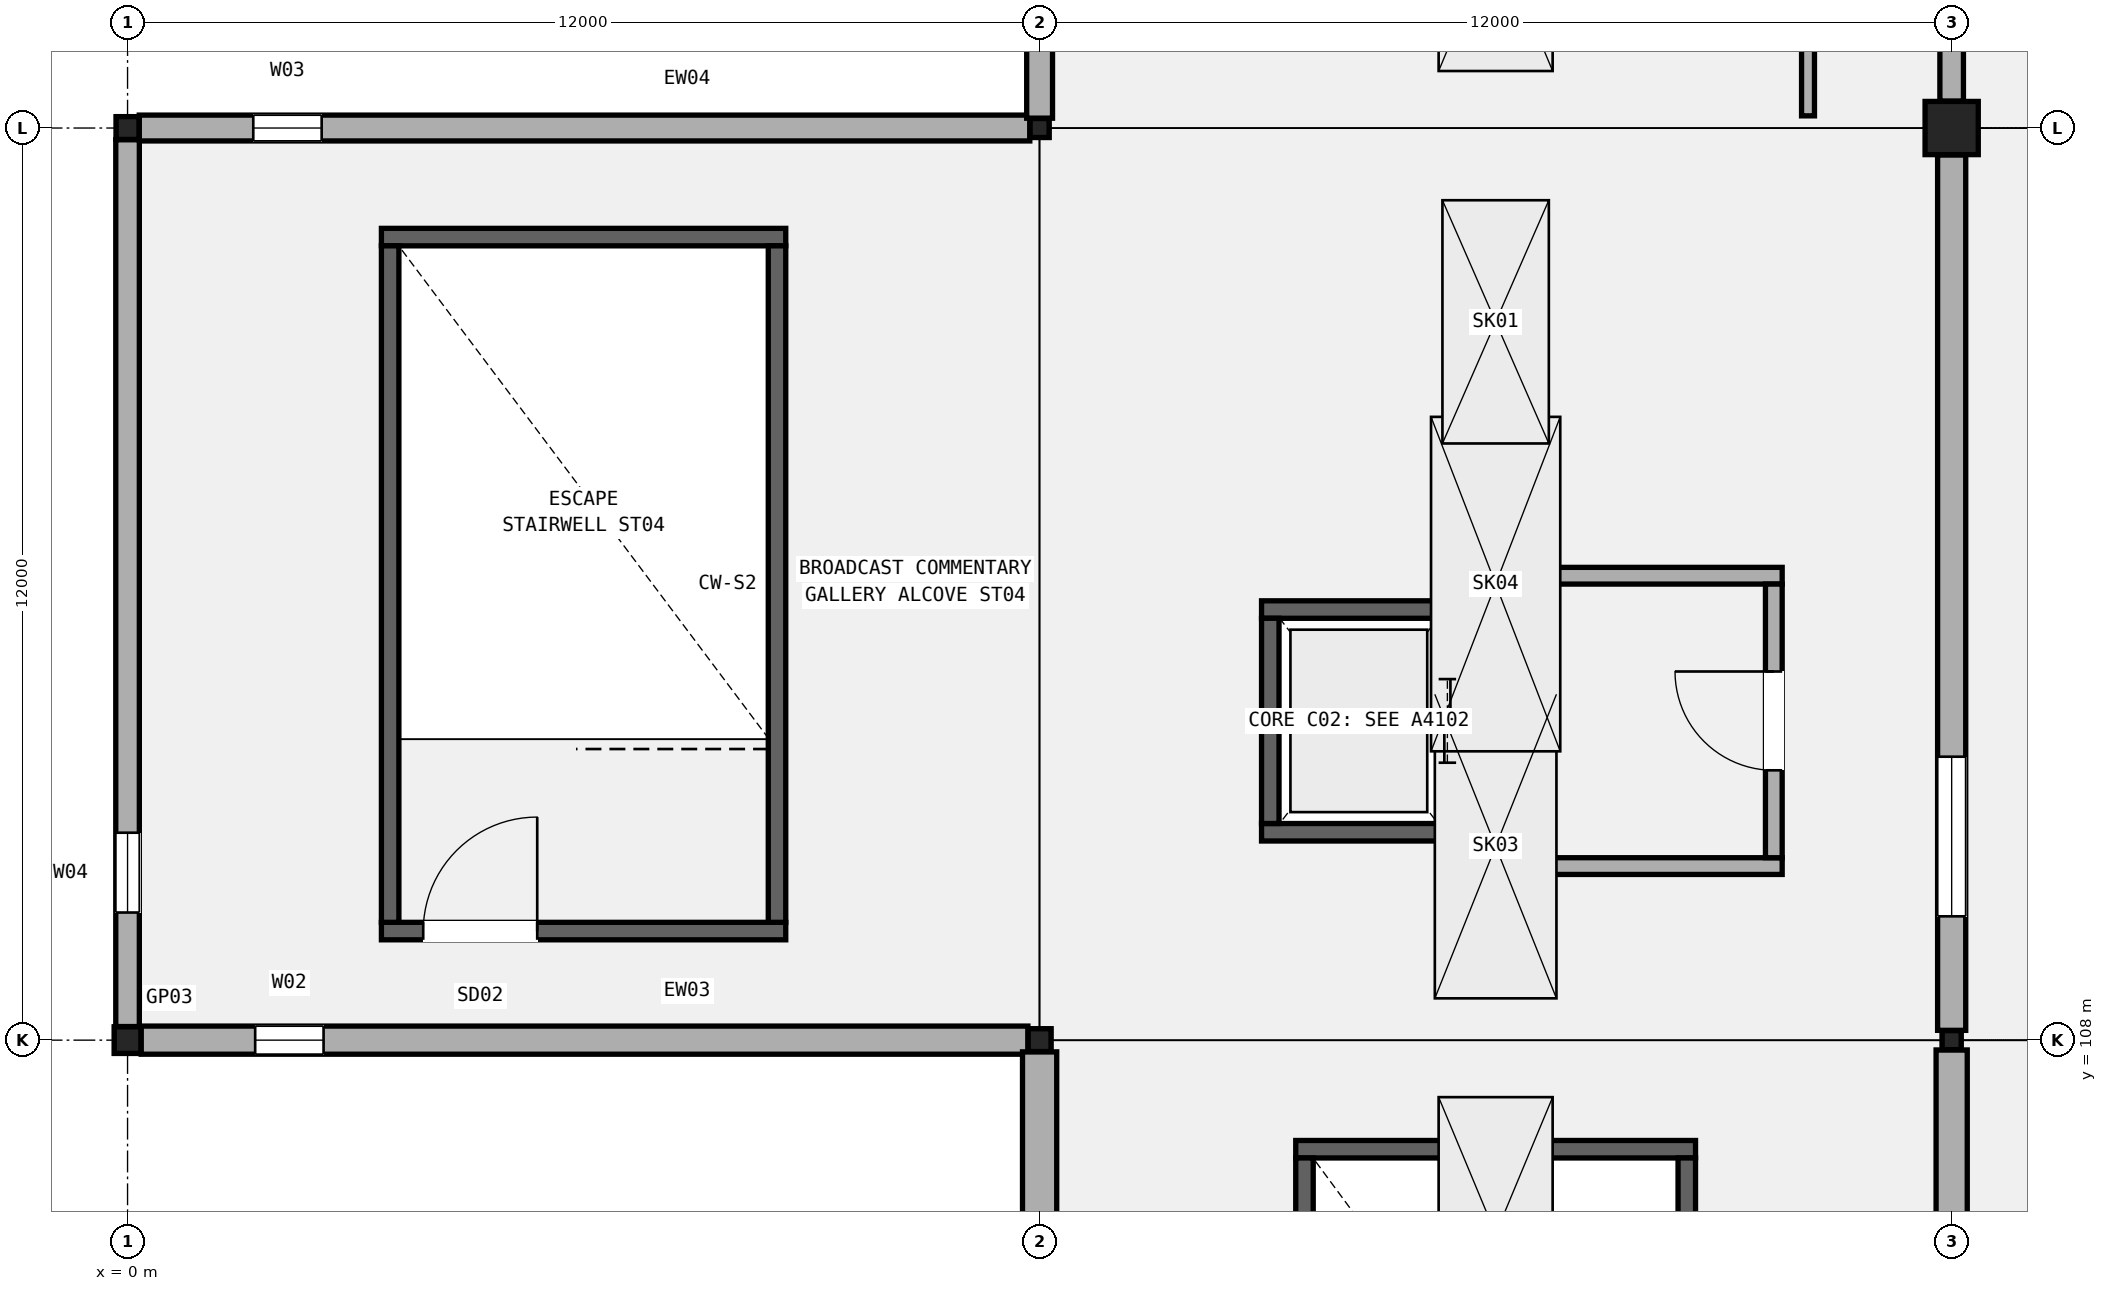
"""IFC4 building model, lengths in metres.
Left out: names, types, materials, properties, quantities, classifications, styles, units other than length and angle.
Written with IfcOpenShell. Run it as: python <this file> out.ifc"""

import sys

from ifc_helpers import new_model, si_unit, direction, frame, frame_2d, origin, origin_2d, place, context, subcontext, project, spatial, rectangle, hollow_rectangle, extrude, element, fill, save


model = new_model("IFC4")
c1 = context("Model", 3, precision=1e-05, world=origin(), true_north=direction((0.0, 1.0)))
c2 = subcontext(c1, "Body", "Model", "MODEL_VIEW")
j1 = project(units=[si_unit("LENGTHUNIT", "METRE"), si_unit("PLANEANGLEUNIT", "RADIAN")], contexts=[c1])
p1 = place(None, origin())
s1 = spatial("IfcSite", under=j1, at=p1, CompositionType="ELEMENT")
p2 = place(p1, origin())
s2 = spatial("IfcBuilding", under=s1, at=p2, CompositionType="ELEMENT")
p3 = place(p2, frame((0.0, 0.0, 25.8)))
s3 = spatial("IfcBuildingStorey", under=s2, at=p3, CompositionType="ELEMENT", Elevation=25.8)
p4 = place(p3, frame((0.0, 108.0, 0.0), z_axis=(0.0, 0.0, 1.0), x_axis=(1.0, 0.0, 0.0)))
e1 = element("IfcColumn", 1, at=p4, inside=s3, PredefinedType="COLUMN", context=c2, shape_type="SweptSolid", body=[
    extrude(hollow_rectangle(XDim=0.35, YDim=0.35, WallThickness=0.016, InnerFilletRadius=0.016, OuterFilletRadius=0.032, at=origin_2d()), origin(), (0.0, 0.0, 1.0), 5.4),
])
for number, where, z_axis, x_axis in (
    (2, (0.0, 120.0, 0.0), (0.0, 0.0, 1.0), (1.0, 0.0, 0.0)),
    (3, (12.0, 108.0, 0.0), (0.0, 0.0, 1.0), (1.0, 0.0, 0.0)),
):
    element("IfcColumn", number, at=place(p3, frame(where, z_axis=z_axis, x_axis=x_axis)), inside=s3, PredefinedType="COLUMN", context=c2, shape_type="SweptSolid", body=[
        extrude(hollow_rectangle(XDim=0.3, YDim=0.3, WallThickness=0.012, InnerFilletRadius=0.012, OuterFilletRadius=0.024, at=origin_2d()), origin(), (0.0, 0.0, 1.0), 5.4),
    ])
for number, where, z_axis, x_axis in (
    (4, (12.0, 120.0, 0.0), (0.0, 0.0, 1.0), (1.0, 0.0, 0.0)),
    (5, (24.0, 108.0, 0.0), (0.0, 0.0, 1.0), (1.0, 0.0, 0.0)),
):
    element("IfcColumn", number, at=place(p3, frame(where, z_axis=z_axis, x_axis=x_axis)), inside=s3, PredefinedType="COLUMN", context=c2, shape_type="SweptSolid", body=[
        extrude(hollow_rectangle(XDim=0.25, YDim=0.25, WallThickness=0.012, InnerFilletRadius=0.012, OuterFilletRadius=0.024, at=origin_2d()), origin(), (0.0, 0.0, 1.0), 5.4),
    ])
p5 = place(p3, frame((24.0, 120.0, 0.0), z_axis=(0.0, 0.0, 1.0), x_axis=(1.0, 0.0, 0.0)))
e6 = element("IfcColumn", 6, at=p5, inside=s3, PredefinedType="COLUMN", context=c2, shape_type="SweptSolid", body=[
    extrude(rectangle(XDim=0.7, YDim=0.7, at=origin_2d()), origin(), (0.0, 0.0, 1.0), 5.4),
])
p6 = place(p3, frame((0.179, 108.0, 0.0), z_axis=(0.0, 0.0, 1.0), x_axis=(1.0, 0.0, 0.0)))
e7 = element("IfcWall", 7, at=p6, inside=s3, PredefinedType="SOLIDWALL", context=c2, shape_type="SweptSolid", body=[
    extrude(rectangle(XDim=11.667, YDim=0.37, at=frame_2d((5.833, 0.0))), origin(), (0.0, 0.0, 1.0), 4.34),
])
p7 = place(p6, frame((1.5, 0.0, 0.95)))
e8 = element("IfcOpeningElement", 8, at=p7, cuts=e7, PredefinedType="OPENING", context=c2, shape_type="SweptSolid", body=[
    extrude(rectangle(XDim=0.9, YDim=2.4, at=frame_2d((0.45, 1.2))), frame((0.0, 0.195, 0.0), z_axis=(0.0, -1.0, 0.0), x_axis=(1.0, 0.0, 0.0)), (0.0, 0.0, 1.0), 0.39),
])
p8 = place(p3, frame((0.154, 120.0, 0.0), z_axis=(0.0, 0.0, 1.0), x_axis=(1.0, 0.0, 0.0)))
e9 = element("IfcWall", 9, at=p8, inside=s3, PredefinedType="SOLIDWALL", context=c2, shape_type="SweptSolid", body=[
    extrude(rectangle(XDim=11.717, YDim=0.34, at=frame_2d((5.858, 0.0))), origin(), (0.0, 0.0, 1.0), 4.44),
])
p9 = place(p8, frame((1.5, 0.0, 0.95)))
e10 = element("IfcOpeningElement", 10, at=p9, cuts=e9, PredefinedType="OPENING", context=c2, shape_type="SweptSolid", body=[
    extrude(rectangle(XDim=0.9, YDim=2.7, at=frame_2d((0.45, 1.35))), frame((0.0, 0.18, 0.0), z_axis=(0.0, -1.0, 0.0), x_axis=(1.0, 0.0, 0.0)), (0.0, 0.0, 1.0), 0.36),
])
p10 = place(p3, frame((0.0, 108.179, 0.0), z_axis=(0.0, 0.0, 1.0), x_axis=(0.0, 1.0, 0.0)))
e11 = element("IfcWall", 11, at=p10, inside=s3, PredefinedType="SOLIDWALL", context=c2, shape_type="SweptSolid", body=[
    extrude(rectangle(XDim=11.667, YDim=0.31, at=frame_2d((5.833, 0.0))), origin(), (0.0, 0.0, 1.0), 4.34),
])
p11 = place(p10, frame((1.5, 0.0, 0.95)))
e12 = element("IfcOpeningElement", 12, at=p11, cuts=e11, PredefinedType="OPENING", context=c2, shape_type="SweptSolid", body=[
    extrude(rectangle(XDim=1.05, YDim=2.2, at=frame_2d((0.525, 1.1))), frame((0.0, 0.165, 0.0), z_axis=(0.0, -1.0, 0.0), x_axis=(1.0, 0.0, 0.0)), (0.0, 0.0, 1.0), 0.33),
])
p12 = place(p3, frame((12.0, 96.179, 0.0), z_axis=(0.0, 0.0, 1.0), x_axis=(0.0, 1.0, 0.0)))
e13 = element("IfcWall", 13, at=p12, inside=s3, PredefinedType="SOLIDWALL", context=c2, shape_type="SweptSolid", body=[
    extrude(rectangle(XDim=11.667, YDim=0.45, at=frame_2d((5.833, 0.0))), origin(), (0.0, 0.0, 1.0), 4.34),
])
p13 = place(p12, frame((1.5, 0.0, 0.95)))
e14 = element("IfcOpeningElement", 14, at=p13, cuts=e13, PredefinedType="OPENING", context=c2, shape_type="SweptSolid", body=[
    extrude(rectangle(XDim=2.1, YDim=1.85, at=frame_2d((1.05, 0.925))), frame((0.0, 0.235, 0.0), z_axis=(0.0, -1.0, 0.0), x_axis=(1.0, 0.0, 0.0)), (0.0, 0.0, 1.0), 0.47),
])
p14 = place(p3, frame((24.0, 96.154, 0.0), z_axis=(0.0, 0.0, 1.0), x_axis=(0.0, 1.0, 0.0)))
e15 = element("IfcWall", 15, at=p14, inside=s3, PredefinedType="SOLIDWALL", context=c2, shape_type="SweptSolid", body=[
    extrude(rectangle(XDim=11.717, YDim=0.41, at=frame_2d((5.858, 0.0))), origin(), (0.0, 0.0, 1.0), 4.13),
])
p15 = place(p14, frame((1.5, 0.0, 0.95)))
e16 = element("IfcOpeningElement", 16, at=p15, cuts=e15, PredefinedType="OPENING", context=c2, shape_type="SweptSolid", body=[
    extrude(rectangle(XDim=2.1, YDim=2.25, at=frame_2d((1.05, 1.125))), frame((0.0, 0.215, 0.0), z_axis=(0.0, -1.0, 0.0), x_axis=(1.0, 0.0, 0.0)), (0.0, 0.0, 1.0), 0.43),
])
p16 = place(p3, frame((24.0, 108.129, 0.0), z_axis=(0.0, 0.0, 1.0), x_axis=(0.0, 1.0, 0.0)))
e17 = element("IfcWall", 17, at=p16, inside=s3, PredefinedType="SOLIDWALL", context=c2, shape_type="SweptSolid", body=[
    extrude(rectangle(XDim=11.517, YDim=0.37, at=frame_2d((5.759, 0.0))), origin(), (0.0, 0.0, 1.0), 4.13),
])
p17 = place(p16, frame((1.5, 0.0, 0.95)))
e18 = element("IfcOpeningElement", 18, at=p17, cuts=e17, PredefinedType="OPENING", context=c2, shape_type="SweptSolid", body=[
    extrude(rectangle(XDim=2.1, YDim=2.6, at=frame_2d((1.05, 1.3))), frame((0.0, 0.195, 0.0), z_axis=(0.0, -1.0, 0.0), x_axis=(1.0, 0.0, 0.0)), (0.0, 0.0, 1.0), 0.39),
])
p18 = place(p3, frame((12.0, 120.129, 0.0), z_axis=(0.0, 0.0, 1.0), x_axis=(0.0, 1.0, 0.0)))
e19 = element("IfcWall", 19, at=p18, inside=s3, PredefinedType="SOLIDWALL", context=c2, shape_type="SweptSolid", body=[
    extrude(rectangle(XDim=11.517, YDim=0.34, at=frame_2d((5.759, 0.0))), origin(), (0.0, 0.0, 1.0), 4.452),
])
p19 = place(p18, frame((6.034, 0.0, 0.95)))
e20 = element("IfcOpeningElement", 20, at=p19, cuts=e19, PredefinedType="OPENING", context=c2, shape_type="SweptSolid", body=[
    extrude(rectangle(XDim=2.25, YDim=1.8, at=frame_2d((1.125, 0.9))), frame((0.0, 0.18, 0.0), z_axis=(0.0, -1.0, 0.0), x_axis=(1.0, 0.0, 0.0)), (0.0, 0.0, 1.0), 0.36),
])
p20 = place(p3, frame((24.0, 120.354, 0.0), z_axis=(0.0, 0.0, 1.0), x_axis=(0.0, 1.0, 0.0)))
e21 = element("IfcWall", 21, at=p20, inside=s3, PredefinedType="SOLIDWALL", context=c2, shape_type="SweptSolid", body=[
    extrude(rectangle(XDim=11.342, YDim=0.31, at=frame_2d((5.671, 0.0))), origin(), (0.0, 0.0, 1.0), 4.13),
])
p21 = place(p20, frame((1.5, 0.0, 0.95)))
e22 = element("IfcOpeningElement", 22, at=p21, cuts=e21, PredefinedType="OPENING", context=c2, shape_type="SweptSolid", body=[
    extrude(rectangle(XDim=2.25, YDim=2.2, at=frame_2d((1.125, 1.1))), frame((0.0, 0.165, 0.0), z_axis=(0.0, -1.0, 0.0), x_axis=(1.0, 0.0, 0.0)), (0.0, 0.0, 1.0), 0.33),
])
p22 = place(p3, frame((3.34, 109.435, 0.0), z_axis=(0.0, 0.0, 1.0), x_axis=(1.0, 0.0, 0.0)))
e23 = element("IfcWall", 23, at=p22, inside=s3, PredefinedType="SHEAR", context=c2, shape_type="SweptSolid", body=[
    extrude(rectangle(XDim=5.32, YDim=0.23, at=frame_2d((2.66, 0.0))), origin(), (0.0, 0.0, 1.0), 5.04),
])
p23 = place(p22, frame((0.55, 0.0, 0.0)))
e24 = element("IfcOpeningElement", 24, at=p23, cuts=e23, PredefinedType="OPENING", context=c2, shape_type="SweptSolid", body=[
    extrude(rectangle(XDim=1.5, YDim=2.2, at=frame_2d((0.75, 1.1))), frame((0.0, 0.125, 0.0), z_axis=(0.0, -1.0, 0.0), x_axis=(1.0, 0.0, 0.0)), (0.0, 0.0, 1.0), 0.25),
])
p24 = place(p3, frame((3.34, 118.565, 0.0), z_axis=(0.0, 0.0, 1.0), x_axis=(1.0, 0.0, 0.0)))
e25 = element("IfcWall", 25, at=p24, inside=s3, PredefinedType="SHEAR", context=c2, shape_type="SweptSolid", body=[
    extrude(rectangle(XDim=5.32, YDim=0.23, at=frame_2d((2.66, 0.0))), origin(), (0.0, 0.0, 1.0), 5.04),
])
for number, where, z_axis, x_axis in (
    (26, (3.455, 109.55, 0.0), (0.0, 0.0, 1.0), (0.0, 1.0, 0.0)),
    (27, (8.545, 109.55, 0.0), (0.0, 0.0, 1.0), (0.0, 1.0, 0.0)),
):
    element("IfcWall", number, at=place(p3, frame(where, z_axis=z_axis, x_axis=x_axis)), inside=s3, PredefinedType="SHEAR", context=c2, shape_type="SweptSolid", body=[
        extrude(rectangle(XDim=8.9, YDim=0.23, at=frame_2d((4.45, 0.0))), origin(), (0.0, 0.0, 1.0), 5.04),
    ])
p25 = place(p3, frame((15.37, 106.565, 0.0), z_axis=(0.0, 0.0, 1.0), x_axis=(1.0, 0.0, 0.0)))
e28 = element("IfcWall", 28, at=p25, inside=s3, PredefinedType="SHEAR", context=c2, shape_type="SweptSolid", body=[
    extrude(rectangle(XDim=5.26, YDim=0.23, at=frame_2d((2.63, 0.0))), origin(), (0.0, 0.0, 1.0), 5.04),
])
for number, where, z_axis, x_axis in (
    (29, (15.485, 97.55, 0.0), (0.0, 0.0, 1.0), (0.0, 1.0, 0.0)),
    (30, (20.515, 97.55, 0.0), (0.0, 0.0, 1.0), (0.0, 1.0, 0.0)),
):
    element("IfcWall", number, at=place(p3, frame(where, z_axis=z_axis, x_axis=x_axis)), inside=s3, PredefinedType="SHEAR", context=c2, shape_type="SweptSolid", body=[
        extrude(rectangle(XDim=8.9, YDim=0.23, at=frame_2d((4.45, 0.0))), origin(), (0.0, 0.0, 1.0), 5.04),
    ])
for number, where, z_axis, x_axis in (
    (31, (14.92, 110.735, 0.0), (0.0, 0.0, 1.0), (1.0, 0.0, 0.0)),
    (32, (14.92, 113.665, 0.0), (0.0, 0.0, 1.0), (1.0, 0.0, 0.0)),
):
    element("IfcWall", number, at=place(p3, frame(where, z_axis=z_axis, x_axis=x_axis)), inside=s3, PredefinedType="SHEAR", context=c2, shape_type="SweptSolid", body=[
        extrude(rectangle(XDim=2.56, YDim=0.23, at=frame_2d((1.28, 0.0))), origin(), (0.0, 0.0, 1.0), 5.04),
    ])
p26 = place(p3, frame((15.035, 110.85, 0.0), z_axis=(0.0, 0.0, 1.0), x_axis=(0.0, 1.0, 0.0)))
e33 = element("IfcWall", 33, at=p26, inside=s3, PredefinedType="SHEAR", context=c2, shape_type="SweptSolid", body=[
    extrude(rectangle(XDim=2.7, YDim=0.23, at=frame_2d((1.35, 0.0))), origin(), (0.0, 0.0, 1.0), 5.04),
])
p27 = place(p3, frame((17.365, 110.85, 0.0), z_axis=(0.0, 0.0, 1.0), x_axis=(0.0, 1.0, 0.0)))
e34 = element("IfcWall", 34, at=p27, inside=s3, PredefinedType="SHEAR", context=c2, shape_type="SweptSolid", body=[
    extrude(rectangle(XDim=2.7, YDim=0.23, at=frame_2d((1.35, 0.0))), origin(), (0.0, 0.0, 1.0), 5.04),
])
p28 = place(p27, frame((0.8, 0.0, 0.0)))
e35 = element("IfcOpeningElement", 35, at=p28, cuts=e34, PredefinedType="OPENING", context=c2, shape_type="SweptSolid", body=[
    extrude(rectangle(XDim=1.1, YDim=2.15, at=frame_2d((0.55, 1.075))), frame((0.0, 0.125, 0.0), z_axis=(0.0, -1.0, 0.0), x_axis=(1.0, 0.0, 0.0)), (0.0, 0.0, 1.0), 0.25),
])
for number, where, z_axis, x_axis in (
    (36, (17.48, 110.29, 0.0), (0.0, 0.0, 1.0), (1.0, 0.0, 0.0)),
    (37, (17.48, 114.11, 0.0), (0.0, 0.0, 1.0), (1.0, 0.0, 0.0)),
):
    element("IfcWall", number, at=place(p3, frame(where, z_axis=z_axis, x_axis=x_axis)), inside=s3, PredefinedType="SOLIDWALL", context=c2, shape_type="SweptSolid", body=[
        extrude(rectangle(XDim=4.29, YDim=0.22, at=frame_2d((2.145, 0.0))), origin(), (0.0, 0.0, 1.0), 4.35),
    ])
p29 = place(p3, frame((21.66, 110.4, 0.0), z_axis=(0.0, 0.0, 1.0), x_axis=(0.0, 1.0, 0.0)))
e38 = element("IfcWall", 38, at=p29, inside=s3, PredefinedType="SOLIDWALL", context=c2, shape_type="SweptSolid", body=[
    extrude(rectangle(XDim=3.6, YDim=0.22, at=frame_2d((1.8, 0.0))), origin(), (0.0, 0.0, 1.0), 4.35),
])
p30 = place(p29, frame((1.15, 0.0, 0.0)))
e39 = element("IfcOpeningElement", 39, at=p30, cuts=e38, PredefinedType="OPENING", context=c2, shape_type="SweptSolid", body=[
    extrude(rectangle(XDim=1.3, YDim=2.15, at=frame_2d((0.65, 1.075))), frame((0.0, 0.12, 0.0), z_axis=(0.0, -1.0, 0.0), x_axis=(1.0, 0.0, 0.0)), (0.0, 0.0, 1.0), 0.24),
])
p31 = place(p3, frame((22.11, 120.16, 0.0), z_axis=(0.0, 0.0, 1.0), x_axis=(0.0, 1.0, 0.0)))
e40 = element("IfcWall", 40, at=p31, inside=s3, PredefinedType="PARTITIONING", context=c2, shape_type="SweptSolid", body=[
    extrude(rectangle(XDim=11.68, YDim=0.17, at=frame_2d((5.84, 0.0))), origin(), (0.0, 0.0, 1.0), 4.35),
])
p32 = place(p31, frame((2.086, 0.0, 0.0)))
e41 = element("IfcOpeningElement", 41, at=p32, cuts=e40, PredefinedType="OPENING", context=c2, shape_type="SweptSolid", body=[
    extrude(rectangle(XDim=1.12, YDim=2.18, at=frame_2d((0.56, 1.09))), frame((0.0, 0.095, 0.0), z_axis=(0.0, -1.0, 0.0), x_axis=(1.0, 0.0, 0.0)), (0.0, 0.0, 1.0), 0.19),
])
p33 = place(p31, frame((7.991, 0.0, 0.0)))
e42 = element("IfcOpeningElement", 42, at=p33, cuts=e40, PredefinedType="OPENING", context=c2, shape_type="SweptSolid", body=[
    extrude(rectangle(XDim=1.15, YDim=2.15, at=frame_2d((0.575, 1.075))), frame((0.0, 0.095, 0.0), z_axis=(0.0, -1.0, 0.0), x_axis=(1.0, 0.0, 0.0)), (0.0, 0.0, 1.0), 0.19),
])
p34 = place(p7, origin())
e43 = element("IfcWindow", 43, at=p34, inside=s3, PartitioningType="SINGLE_PANEL", PredefinedType="WINDOW", context=c2, shape_type="SweptSolid", body=[
    extrude(rectangle(XDim=0.9, YDim=2.4, at=frame_2d((0.45, 1.2))), frame((0.0, 0.03, 0.0), z_axis=(0.0, -1.0, 0.0), x_axis=(1.0, 0.0, 0.0)), (0.0, 0.0, 1.0), 0.06),
])
fill(e8, e43)
p35 = place(p9, origin())
e44 = element("IfcWindow", 44, at=p35, inside=s3, PartitioningType="SINGLE_PANEL", PredefinedType="WINDOW", context=c2, shape_type="SweptSolid", body=[
    extrude(rectangle(XDim=0.9, YDim=2.7, at=frame_2d((0.45, 1.35))), frame((0.0, 0.03, 0.0), z_axis=(0.0, -1.0, 0.0), x_axis=(1.0, 0.0, 0.0)), (0.0, 0.0, 1.0), 0.06),
])
fill(e10, e44)
p36 = place(p11, origin())
e45 = element("IfcWindow", 45, at=p36, inside=s3, PartitioningType="SINGLE_PANEL", PredefinedType="WINDOW", context=c2, shape_type="SweptSolid", body=[
    extrude(rectangle(XDim=1.05, YDim=2.2, at=frame_2d((0.525, 1.1))), frame((0.0, 0.03, 0.0), z_axis=(0.0, -1.0, 0.0), x_axis=(1.0, 0.0, 0.0)), (0.0, 0.0, 1.0), 0.06),
])
fill(e12, e45)
p37 = place(p17, origin())
e46 = element("IfcWindow", 46, at=p37, inside=s3, PartitioningType="SINGLE_PANEL", PredefinedType="WINDOW", context=c2, shape_type="SweptSolid", body=[
    extrude(rectangle(XDim=2.1, YDim=2.6, at=frame_2d((1.05, 1.3))), frame((0.0, 0.03, 0.0), z_axis=(0.0, -1.0, 0.0), x_axis=(1.0, 0.0, 0.0)), (0.0, 0.0, 1.0), 0.06),
])
fill(e18, e46)
p38 = place(p2, frame((0.0, 0.0, 31.2)))
p39 = place(p38, frame((0.0, 0.0, -0.36)))
p40 = place(p39, frame((18.0, 105.45, 0.0)))
p41 = place(p40, frame((0.0, 0.0, 0.31)))
e47 = element("IfcWindow", 47, at=p41, inside=s3, PartitioningType="SINGLE_PANEL", PredefinedType="SKYLIGHT", context=c2, shape_type="SweptSolid", body=[
    extrude(rectangle(XDim=3.6, YDim=1.5, at=origin_2d()), origin(), (0.0, 0.0, 1.0), 0.05),
])
p42 = place(p38, frame((0.0, 0.0, -0.36)))
p43 = place(p42, frame((18.0, 110.55, 0.0)))
p44 = place(p43, frame((0.0, 0.0, 0.31)))
e48 = element("IfcWindow", 48, at=p44, inside=s3, PartitioningType="SINGLE_PANEL", PredefinedType="SKYLIGHT", context=c2, shape_type="SweptSolid", body=[
    extrude(rectangle(XDim=4.0, YDim=1.6, at=origin_2d()), origin(), (0.0, 0.0, 1.0), 0.05),
])
p45 = place(p42, frame((18.0, 114.0, 0.0)))
p46 = place(p45, frame((0.0, 0.0, 0.31)))
e49 = element("IfcWindow", 49, at=p46, inside=s3, PartitioningType="SINGLE_PANEL", PredefinedType="SKYLIGHT", context=c2, shape_type="SweptSolid", body=[
    extrude(rectangle(XDim=4.4, YDim=1.7, at=origin_2d()), origin(), (0.0, 0.0, 1.0), 0.05),
])
p47 = place(p42, frame((18.0, 117.45, 0.0)))
p48 = place(p47, frame((0.0, 0.0, 0.31)))
e50 = element("IfcWindow", 50, at=p48, inside=s3, PartitioningType="SINGLE_PANEL", PredefinedType="SKYLIGHT", context=c2, shape_type="SweptSolid", body=[
    extrude(rectangle(XDim=3.2, YDim=1.4, at=origin_2d()), origin(), (0.0, 0.0, 1.0), 0.05),
])
p49 = place(p23, origin())
e51 = element("IfcDoor", 51, at=p49, inside=s3, OperationType="SINGLE_SWING_RIGHT", PredefinedType="DOOR", context=c2, shape_type="SweptSolid", body=[
    extrude(rectangle(XDim=1.5, YDim=2.2, at=frame_2d((0.75, 1.1))), frame((0.0, 0.025, 0.0), z_axis=(0.0, -1.0, 0.0), x_axis=(1.0, 0.0, 0.0)), (0.0, 0.0, 1.0), 0.05),
])
fill(e24, e51)
p50 = place(p28, origin())
e52 = element("IfcDoor", 52, at=p50, inside=s3, OperationType="DOUBLE_DOOR_SLIDING", PredefinedType="DOOR", context=c2, shape_type="SweptSolid", body=[
    extrude(rectangle(XDim=1.1, YDim=2.15, at=frame_2d((0.55, 1.075))), frame((0.0, 0.025, 0.0), z_axis=(0.0, -1.0, 0.0), x_axis=(1.0, 0.0, 0.0)), (0.0, 0.0, 1.0), 0.05),
])
fill(e35, e52)
p51 = place(p30, origin())
e53 = element("IfcDoor", 53, at=p51, inside=s3, OperationType="SINGLE_SWING_RIGHT", PredefinedType="DOOR", context=c2, shape_type="SweptSolid", body=[
    extrude(rectangle(XDim=1.3, YDim=2.15, at=frame_2d((0.65, 1.075))), frame((0.0, 0.025, 0.0), z_axis=(0.0, -1.0, 0.0), x_axis=(1.0, 0.0, 0.0)), (0.0, 0.0, 1.0), 0.05),
])
fill(e39, e53)
save(model, sys.argv[1])
